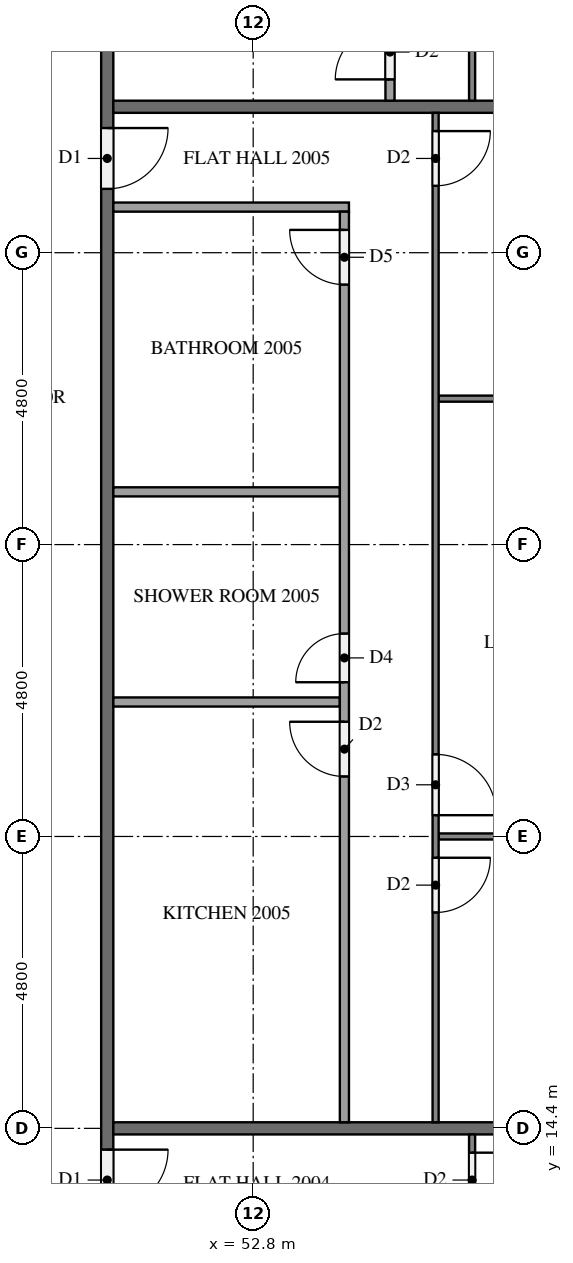
"""IFC4 building model, lengths in metres.
Left out: names, types, materials, properties, quantities, classifications, styles, units other than length and angle.
Written with IfcOpenShell. Run it as: python <this file> out.ifc"""

import sys

from ifc_helpers import new_model, si_unit, direction, frame, frame_2d, origin, place, context, subcontext, project, spatial, rectangle, extrude, element, fill, save


model = new_model("IFC4")
c1 = context("Model", 3, precision=1e-05, world=origin(), true_north=direction((0.0, 1.0)))
c2 = subcontext(c1, "Body", "Model", "MODEL_VIEW")
j1 = project(units=[si_unit("LENGTHUNIT", "METRE"), si_unit("PLANEANGLEUNIT", "RADIAN")], contexts=[c1])
p1 = place(None, origin())
s1 = spatial("IfcSite", under=j1, at=p1, CompositionType="ELEMENT")
p2 = place(p1, origin())
s2 = spatial("IfcBuilding", under=s1, at=p2, CompositionType="ELEMENT")
p3 = place(p2, frame((0.0, 0.0, 80.3)))
s3 = spatial("IfcBuildingStorey", under=s2, at=p3, CompositionType="ELEMENT", Elevation=80.3)
p4 = place(p3, frame((50.4, 40.7, 0.0), z_axis=(0.0, 0.0, 1.0), x_axis=(0.0, -1.0, 0.0)))
e1 = element("IfcWall", 1, at=p4, inside=s3, PredefinedType="PARTITIONING", context=c2, shape_type="SweptSolid", body=[
    extrude(rectangle(XDim=28.6, YDim=0.2, at=frame_2d((14.3, 0.0))), origin(), (0.0, 0.0, 1.0), 3.1),
])
p5 = place(p4, frame((26.65, 0.0, 0.0)))
e2 = element("IfcOpeningElement", 2, at=p5, cuts=e1, PredefinedType="OPENING", context=c2, shape_type="SweptSolid", body=[
    extrude(rectangle(XDim=1.0, YDim=2.1, at=frame_2d((0.5, 1.05))), frame((0.0, 0.11, 0.0), z_axis=(0.0, -1.0, 0.0), x_axis=(1.0, 0.0, 0.0)), (0.0, 0.0, 1.0), 0.22),
])
p6 = place(p4, frame((9.85, 0.0, 0.0)))
e3 = element("IfcOpeningElement", 3, at=p6, cuts=e1, PredefinedType="OPENING", context=c2, shape_type="SweptSolid", body=[
    extrude(rectangle(XDim=1.0, YDim=2.1, at=frame_2d((0.5, 1.05))), frame((0.0, 0.11, 0.0), z_axis=(0.0, -1.0, 0.0), x_axis=(1.0, 0.0, 0.0)), (0.0, 0.0, 1.0), 0.22),
])
p7 = place(p4, frame((2.65, 0.0, 0.0)))
e4 = element("IfcOpeningElement", 4, at=p7, cuts=e1, PredefinedType="OPENING", context=c2, shape_type="SweptSolid", body=[
    extrude(rectangle(XDim=1.0, YDim=2.1, at=frame_2d((0.5, 1.05))), frame((0.0, 0.11, 0.0), z_axis=(0.0, -1.0, 0.0), x_axis=(1.0, 0.0, 0.0)), (0.0, 0.0, 1.0), 0.22),
])
p8 = place(p4, frame((0.95, 0.0, 0.0)))
e5 = element("IfcOpeningElement", 5, at=p8, cuts=e1, PredefinedType="OPENING", context=c2, shape_type="SweptSolid", body=[
    extrude(rectangle(XDim=1.0, YDim=2.1, at=frame_2d((0.5, 1.05))), frame((0.0, 0.11, 0.0), z_axis=(0.0, -1.0, 0.0), x_axis=(1.0, 0.0, 0.0)), (0.0, 0.0, 1.0), 0.22),
])
p9 = place(p3, frame((50.5, 14.4, 0.0), z_axis=(0.0, 0.0, 1.0), x_axis=(1.0, 0.0, 0.0)))
e6 = element("IfcWall", 6, at=p9, inside=s3, PredefinedType="PARTITIONING", context=c2, shape_type="SweptSolid", body=[
    extrude(rectangle(XDim=11.475, YDim=0.2, at=frame_2d((5.738, 0.0))), origin(), (0.0, 0.0, 1.0), 3.1),
])
p10 = place(p3, frame((50.5, 31.2, 0.0), z_axis=(0.0, 0.0, 1.0), x_axis=(1.0, 0.0, 0.0)))
e7 = element("IfcWall", 7, at=p10, inside=s3, PredefinedType="PARTITIONING", context=c2, shape_type="SweptSolid", body=[
    extrude(rectangle(XDim=11.8, YDim=0.2, at=frame_2d((5.9, 0.0))), origin(), (0.0, 0.0, 1.0), 3.1),
])
p11 = place(p3, frame((56.4, 14.3, 0.0), z_axis=(0.0, 0.0, 1.0), x_axis=(0.0, -1.0, 0.0)))
e8 = element("IfcWall", 8, at=p11, inside=s3, PredefinedType="PARTITIONING", context=c2, shape_type="SweptSolid", body=[
    extrude(rectangle(XDim=14.2, YDim=0.1, at=frame_2d((7.1, 0.0))), origin(), (0.0, 0.0, 1.0), 3.1),
])
p12 = place(p11, frame((0.3, 0.0, 0.0)))
e9 = element("IfcOpeningElement", 9, at=p12, cuts=e8, PredefinedType="OPENING", context=c2, shape_type="SweptSolid", body=[
    extrude(rectangle(XDim=0.9, YDim=2.1, at=frame_2d((0.45, 1.05))), frame((0.0, 0.06, 0.0), z_axis=(0.0, -1.0, 0.0), x_axis=(1.0, 0.0, 0.0)), (0.0, 0.0, 1.0), 0.12),
])
p13 = place(p11, frame((8.15, 0.0, 0.0)))
e10 = element("IfcOpeningElement", 10, at=p13, cuts=e8, PredefinedType="OPENING", context=c2, shape_type="SweptSolid", body=[
    extrude(rectangle(XDim=1.0, YDim=2.1, at=frame_2d((0.5, 1.05))), frame((0.0, 0.06, 0.0), z_axis=(0.0, -1.0, 0.0), x_axis=(1.0, 0.0, 0.0)), (0.0, 0.0, 1.0), 0.12),
])
p14 = place(p11, frame((9.85, 0.0, 0.0)))
e11 = element("IfcOpeningElement", 11, at=p14, cuts=e8, PredefinedType="OPENING", context=c2, shape_type="SweptSolid", body=[
    extrude(rectangle(XDim=0.9, YDim=2.1, at=frame_2d((0.45, 1.05))), frame((0.0, 0.06, 0.0), z_axis=(0.0, -1.0, 0.0), x_axis=(1.0, 0.0, 0.0)), (0.0, 0.0, 1.0), 0.12),
])
for number, where, z_axis, x_axis in (
    (12, (55.85, 26.4, 0.0), (0.0, 0.0, 1.0), (1.0, 0.0, 0.0)),
    (13, (55.85, 19.2, 0.0), (0.0, 0.0, 1.0), (1.0, 0.0, 0.0)),
):
    element("IfcWall", number, at=place(p3, frame(where, z_axis=z_axis, x_axis=x_axis)), inside=s3, PredefinedType="PARTITIONING", context=c2, shape_type="SweptSolid", body=[
        extrude(rectangle(XDim=6.45, YDim=0.1, at=frame_2d((3.225, 0.0))), origin(), (0.0, 0.0, 1.0), 3.1),
    ])
p15 = place(p3, frame((55.8, 31.1, 0.0), z_axis=(0.0, 0.0, 1.0), x_axis=(0.0, -1.0, 0.0)))
e14 = element("IfcWall", 14, at=p15, inside=s3, PredefinedType="PARTITIONING", context=c2, shape_type="SweptSolid", body=[
    extrude(rectangle(XDim=16.6, YDim=0.1, at=frame_2d((8.3, 0.0))), origin(), (0.0, 0.0, 1.0), 3.1),
])
p16 = place(p15, frame((0.3, 0.0, 0.0)))
e15 = element("IfcOpeningElement", 15, at=p16, cuts=e14, PredefinedType="OPENING", context=c2, shape_type="SweptSolid", body=[
    extrude(rectangle(XDim=0.9, YDim=2.1, at=frame_2d((0.45, 1.05))), frame((0.0, 0.06, 0.0), z_axis=(0.0, -1.0, 0.0), x_axis=(1.0, 0.0, 0.0)), (0.0, 0.0, 1.0), 0.12),
])
p17 = place(p15, frame((10.55, 0.0, 0.0)))
e16 = element("IfcOpeningElement", 16, at=p17, cuts=e14, PredefinedType="OPENING", context=c2, shape_type="SweptSolid", body=[
    extrude(rectangle(XDim=1.0, YDim=2.1, at=frame_2d((0.5, 1.05))), frame((0.0, 0.06, 0.0), z_axis=(0.0, -1.0, 0.0), x_axis=(1.0, 0.0, 0.0)), (0.0, 0.0, 1.0), 0.12),
])
p18 = place(p15, frame((12.25, 0.0, 0.0)))
e17 = element("IfcOpeningElement", 17, at=p18, cuts=e14, PredefinedType="OPENING", context=c2, shape_type="SweptSolid", body=[
    extrude(rectangle(XDim=0.9, YDim=2.1, at=frame_2d((0.45, 1.05))), frame((0.0, 0.06, 0.0), z_axis=(0.0, -1.0, 0.0), x_axis=(1.0, 0.0, 0.0)), (0.0, 0.0, 1.0), 0.12),
])
for number, where, z_axis, x_axis in (
    (18, (50.5, 24.867, 0.0), (0.0, 0.0, 1.0), (1.0, 0.0, 0.0)),
    (19, (50.5, 21.412, 0.0), (0.0, 0.0, 1.0), (1.0, 0.0, 0.0)),
):
    element("IfcWall", number, at=place(p3, frame(where, z_axis=z_axis, x_axis=x_axis)), inside=s3, PredefinedType="PARTITIONING", context=c2, shape_type="SweptSolid", body=[
        extrude(rectangle(XDim=3.725, YDim=0.15, at=frame_2d((1.863, 0.0))), origin(), (0.0, 0.0, 1.0), 3.1),
    ])
p19 = place(p3, frame((50.5, 29.55, 0.0), z_axis=(0.0, 0.0, 1.0), x_axis=(1.0, 0.0, 0.0)))
e20 = element("IfcWall", 20, at=p19, inside=s3, PredefinedType="PARTITIONING", context=c2, shape_type="SweptSolid", body=[
    extrude(rectangle(XDim=3.875, YDim=0.15, at=frame_2d((1.938, 0.0))), origin(), (0.0, 0.0, 1.0), 3.1),
])
p20 = place(p3, frame((54.3, 14.5, 0.0), z_axis=(0.0, 0.0, 1.0), x_axis=(0.0, 1.0, 0.0)))
e21 = element("IfcWall", 21, at=p20, inside=s3, PredefinedType="PARTITIONING", context=c2, shape_type="SweptSolid", body=[
    extrude(rectangle(XDim=14.975, YDim=0.15, at=frame_2d((7.488, 0.0))), origin(), (0.0, 0.0, 1.0), 3.1),
])
p21 = place(p20, frame((13.775, 0.0, 0.0)))
e22 = element("IfcOpeningElement", 22, at=p21, cuts=e21, PredefinedType="OPENING", context=c2, shape_type="SweptSolid", body=[
    extrude(rectangle(XDim=0.9, YDim=2.1, at=frame_2d((0.45, 1.05))), frame((0.0, 0.085, 0.0), z_axis=(0.0, -1.0, 0.0), x_axis=(1.0, 0.0, 0.0)), (0.0, 0.0, 1.0), 0.17),
])
p22 = place(p20, frame((7.237, 0.0, 0.0)))
e23 = element("IfcOpeningElement", 23, at=p22, cuts=e21, PredefinedType="OPENING", context=c2, shape_type="SweptSolid", body=[
    extrude(rectangle(XDim=0.8, YDim=2.1, at=frame_2d((0.4, 1.05))), frame((0.0, 0.085, 0.0), z_axis=(0.0, -1.0, 0.0), x_axis=(1.0, 0.0, 0.0)), (0.0, 0.0, 1.0), 0.17),
])
p23 = place(p20, frame((5.687, 0.0, 0.0)))
e24 = element("IfcOpeningElement", 24, at=p23, cuts=e21, PredefinedType="OPENING", context=c2, shape_type="SweptSolid", body=[
    extrude(rectangle(XDim=0.9, YDim=2.1, at=frame_2d((0.45, 1.05))), frame((0.0, 0.085, 0.0), z_axis=(0.0, -1.0, 0.0), x_axis=(1.0, 0.0, 0.0)), (0.0, 0.0, 1.0), 0.17),
])
p24 = place(p3, frame((56.4, 38.3, 0.0), z_axis=(0.0, 0.0, 1.0), x_axis=(0.0, -1.0, 0.0)))
e25 = element("IfcWall", 25, at=p24, inside=s3, PredefinedType="PARTITIONING", context=c2, shape_type="SweptSolid", body=[
    extrude(rectangle(XDim=7.0, YDim=0.1, at=frame_2d((3.5, 0.0))), origin(), (0.0, 0.0, 1.0), 3.1),
])
p25 = place(p24, frame((0.3, 0.0, 0.0)))
e26 = element("IfcOpeningElement", 26, at=p25, cuts=e25, PredefinedType="OPENING", context=c2, shape_type="SweptSolid", body=[
    extrude(rectangle(XDim=1.0, YDim=2.1, at=frame_2d((0.5, 1.05))), frame((0.0, 0.06, 0.0), z_axis=(0.0, -1.0, 0.0), x_axis=(1.0, 0.0, 0.0)), (0.0, 0.0, 1.0), 0.12),
])
p26 = place(p3, frame((55.05, 31.3, 0.0), z_axis=(0.0, 0.0, 1.0), x_axis=(0.0, 1.0, 0.0)))
e27 = element("IfcWall", 27, at=p26, inside=s3, PredefinedType="PARTITIONING", context=c2, shape_type="SweptSolid", body=[
    extrude(rectangle(XDim=5.375, YDim=0.15, at=frame_2d((2.688, 0.0))), origin(), (0.0, 0.0, 1.0), 3.1),
])
p27 = place(p26, frame((4.275, 0.0, 0.0)))
e28 = element("IfcOpeningElement", 28, at=p27, cuts=e27, PredefinedType="OPENING", context=c2, shape_type="SweptSolid", body=[
    extrude(rectangle(XDim=0.8, YDim=2.1, at=frame_2d((0.4, 1.05))), frame((0.0, 0.085, 0.0), z_axis=(0.0, -1.0, 0.0), x_axis=(1.0, 0.0, 0.0)), (0.0, 0.0, 1.0), 0.17),
])
p28 = place(p26, frame((0.35, 0.0, 0.0)))
e29 = element("IfcOpeningElement", 29, at=p28, cuts=e27, PredefinedType="OPENING", context=c2, shape_type="SweptSolid", body=[
    extrude(rectangle(XDim=0.9, YDim=2.1, at=frame_2d((0.45, 1.05))), frame((0.0, 0.085, 0.0), z_axis=(0.0, -1.0, 0.0), x_axis=(1.0, 0.0, 0.0)), (0.0, 0.0, 1.0), 0.17),
])
p29 = place(p5, origin())
e30 = element("IfcDoor", 30, at=p29, inside=s3, OperationType="SINGLE_SWING_LEFT", PredefinedType="DOOR", context=c2, shape_type="SweptSolid", body=[
    extrude(rectangle(XDim=1.0, YDim=2.1, at=frame_2d((0.5, 1.05))), frame((0.0, 0.025, 0.0), z_axis=(0.0, -1.0, 0.0), x_axis=(1.0, 0.0, 0.0)), (0.0, 0.0, 1.0), 0.05),
])
fill(e2, e30)
p30 = place(p6, origin())
e31 = element("IfcDoor", 31, at=p30, inside=s3, OperationType="SINGLE_SWING_LEFT", PredefinedType="DOOR", context=c2, shape_type="SweptSolid", body=[
    extrude(rectangle(XDim=1.0, YDim=2.1, at=frame_2d((0.5, 1.05))), frame((0.0, 0.025, 0.0), z_axis=(0.0, -1.0, 0.0), x_axis=(1.0, 0.0, 0.0)), (0.0, 0.0, 1.0), 0.05),
])
fill(e3, e31)
p31 = place(p12, origin())
e32 = element("IfcDoor", 32, at=p31, inside=s3, OperationType="SINGLE_SWING_LEFT", PredefinedType="DOOR", context=c2, shape_type="SweptSolid", body=[
    extrude(rectangle(XDim=0.9, YDim=2.1, at=frame_2d((0.45, 1.05))), frame((0.0, 0.025, 0.0), z_axis=(0.0, -1.0, 0.0), x_axis=(1.0, 0.0, 0.0)), (0.0, 0.0, 1.0), 0.05),
])
fill(e9, e32)
p32 = place(p16, origin())
e33 = element("IfcDoor", 33, at=p32, inside=s3, OperationType="SINGLE_SWING_LEFT", PredefinedType="DOOR", context=c2, shape_type="SweptSolid", body=[
    extrude(rectangle(XDim=0.9, YDim=2.1, at=frame_2d((0.45, 1.05))), frame((0.0, 0.025, 0.0), z_axis=(0.0, -1.0, 0.0), x_axis=(1.0, 0.0, 0.0)), (0.0, 0.0, 1.0), 0.05),
])
fill(e15, e33)
p33 = place(p17, origin())
e34 = element("IfcDoor", 34, at=p33, inside=s3, OperationType="SINGLE_SWING_RIGHT", PredefinedType="DOOR", context=c2, shape_type="SweptSolid", body=[
    extrude(rectangle(XDim=1.0, YDim=2.1, at=frame_2d((0.5, 1.05))), frame((0.0, 0.025, 0.0), z_axis=(0.0, -1.0, 0.0), x_axis=(1.0, 0.0, 0.0)), (0.0, 0.0, 1.0), 0.05),
])
fill(e16, e34)
p34 = place(p18, origin())
e35 = element("IfcDoor", 35, at=p34, inside=s3, OperationType="SINGLE_SWING_LEFT", PredefinedType="DOOR", context=c2, shape_type="SweptSolid", body=[
    extrude(rectangle(XDim=0.9, YDim=2.1, at=frame_2d((0.45, 1.05))), frame((0.0, 0.025, 0.0), z_axis=(0.0, -1.0, 0.0), x_axis=(1.0, 0.0, 0.0)), (0.0, 0.0, 1.0), 0.05),
])
fill(e17, e35)
p35 = place(p21, origin())
e36 = element("IfcDoor", 36, at=p35, inside=s3, OperationType="SINGLE_SWING_RIGHT", PredefinedType="DOOR", context=c2, shape_type="SweptSolid", body=[
    extrude(rectangle(XDim=0.9, YDim=2.1, at=frame_2d((0.45, 1.05))), frame((0.0, 0.025, 0.0), z_axis=(0.0, -1.0, 0.0), x_axis=(1.0, 0.0, 0.0)), (0.0, 0.0, 1.0), 0.05),
])
fill(e22, e36)
p36 = place(p22, origin())
e37 = element("IfcDoor", 37, at=p36, inside=s3, OperationType="SINGLE_SWING_LEFT", PredefinedType="DOOR", context=c2, shape_type="SweptSolid", body=[
    extrude(rectangle(XDim=0.8, YDim=2.1, at=frame_2d((0.4, 1.05))), frame((0.0, 0.025, 0.0), z_axis=(0.0, -1.0, 0.0), x_axis=(1.0, 0.0, 0.0)), (0.0, 0.0, 1.0), 0.05),
])
fill(e23, e37)
p37 = place(p23, origin())
e38 = element("IfcDoor", 38, at=p37, inside=s3, OperationType="SINGLE_SWING_RIGHT", PredefinedType="DOOR", context=c2, shape_type="SweptSolid", body=[
    extrude(rectangle(XDim=0.9, YDim=2.1, at=frame_2d((0.45, 1.05))), frame((0.0, 0.025, 0.0), z_axis=(0.0, -1.0, 0.0), x_axis=(1.0, 0.0, 0.0)), (0.0, 0.0, 1.0), 0.05),
])
fill(e24, e38)
p38 = place(p28, origin())
e39 = element("IfcDoor", 39, at=p38, inside=s3, OperationType="SINGLE_SWING_LEFT", PredefinedType="DOOR", context=c2, shape_type="SweptSolid", body=[
    extrude(rectangle(XDim=0.9, YDim=2.1, at=frame_2d((0.45, 1.05))), frame((0.0, 0.025, 0.0), z_axis=(0.0, -1.0, 0.0), x_axis=(1.0, 0.0, 0.0)), (0.0, 0.0, 1.0), 0.05),
])
fill(e29, e39)
save(model, sys.argv[1])
